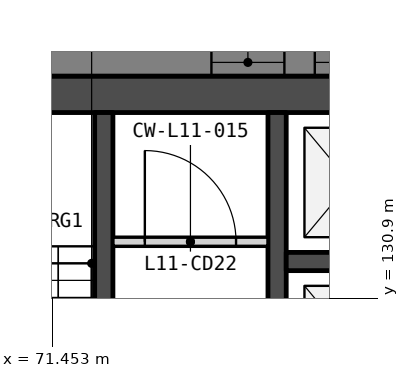
"""IFC4 building model, lengths in metres.
Left out: names, types, materials, properties, quantities, classifications, styles, units other than length and angle.
Written with IfcOpenShell. Run it as: python <this file> out.ifc"""

import sys

from ifc_helpers import new_model, si_unit, direction, frame, frame_2d, origin, place, context, subcontext, project, spatial, polyline, rectangle, outline, extrude, element, fill, save


model = new_model("IFC4")
c1 = context("Model", 3, precision=1e-05, world=origin(), true_north=direction((0.0, 1.0)))
c2 = subcontext(c1, "Body", "Model", "MODEL_VIEW")
j1 = project(units=[si_unit("LENGTHUNIT", "METRE"), si_unit("PLANEANGLEUNIT", "RADIAN")], contexts=[c1])
p1 = place(None, origin())
s1 = spatial("IfcSite", under=j1, at=p1, CompositionType="ELEMENT")
p2 = place(p1, origin())
s2 = spatial("IfcBuilding", under=s1, at=p2, CompositionType="ELEMENT")
p3 = place(p2, frame((0.0, 0.0, 52.5)))
s3 = spatial("IfcBuildingStorey", under=s2, at=p3, CompositionType="ELEMENT", Elevation=52.5)
p4 = place(p3, frame((66.0, 134.25, 0.0), z_axis=(0.0, 0.0, 1.0), x_axis=(1.0, 0.0, 0.0)))
e1 = element("IfcWall", 1, at=p4, inside=s3, PredefinedType="SOLIDWALL", context=c2, shape_type="SweptSolid", body=[
    extrude(rectangle(XDim=28.0, YDim=0.6, at=frame_2d((14.0, 0.0))), origin(), (0.0, 0.0, 1.0), 3.35),
])
p5 = place(p3, frame((72.3, 133.95, 0.0), z_axis=(0.0, 0.0, 1.0), x_axis=(0.0, -1.0, 0.0)))
e2 = element("IfcWall", 2, at=p5, inside=s3, PredefinedType="SOLIDWALL", context=c2, shape_type="SweptSolid", body=[
    extrude(rectangle(XDim=11.7, YDim=0.3, at=frame_2d((5.85, 0.0))), origin(), (0.0, 0.0, 1.0), 3.35),
])
p6 = place(p5, frame((6.95, 0.0, 0.0)))
e3 = element("IfcOpeningElement", 3, at=p6, cuts=e2, PredefinedType="OPENING", context=c2, shape_type="SweptSolid", body=[
    extrude(rectangle(XDim=1.1, YDim=2.1, at=frame_2d((0.55, 1.05))), frame((0.0, 0.16, 0.0), z_axis=(0.0, -1.0, 0.0), x_axis=(1.0, 0.0, 0.0)), (0.0, 0.0, 1.0), 0.32),
])
p7 = place(p5, frame((9.35, 0.0, 0.0)))
e4 = element("IfcOpeningElement", 4, at=p7, cuts=e2, PredefinedType="OPENING", context=c2, shape_type="SweptSolid", body=[
    extrude(rectangle(XDim=0.9, YDim=2.1, at=frame_2d((0.45, 1.05))), frame((0.0, 0.16, 0.0), z_axis=(0.0, -1.0, 0.0), x_axis=(1.0, 0.0, 0.0)), (0.0, 0.0, 1.0), 0.32),
])
p8 = place(p5, frame((5.1, 0.0, 0.0)))
e5 = element("IfcOpeningElement", 5, at=p8, cuts=e2, PredefinedType="OPENING", context=c2, shape_type="SweptSolid", body=[
    extrude(rectangle(XDim=1.0, YDim=2.1, at=frame_2d((0.5, 1.05))), frame((0.0, 0.16, 0.0), z_axis=(0.0, -1.0, 0.0), x_axis=(1.0, 0.0, 0.0)), (0.0, 0.0, 1.0), 0.32),
])
p9 = place(p3, frame((72.45, 131.825, 0.0), z_axis=(0.0, 0.0, 1.0), x_axis=(1.0, 0.0, 0.0)))
e6 = element("IfcWall", 6, at=p9, inside=s3, PredefinedType="PARTITIONING", context=c2, shape_type="SweptSolid", body=[
    extrude(rectangle(XDim=2.55, YDim=0.15, at=frame_2d((1.275, 0.0))), origin(), (0.0, 0.0, 1.0), 3.35),
])
p10 = place(p9, frame((0.525, 0.0, 0.0)))
e7 = element("IfcOpeningElement", 7, at=p10, cuts=e6, PredefinedType="OPENING", context=c2, shape_type="SweptSolid", body=[
    extrude(rectangle(XDim=1.5, YDim=2.1, at=frame_2d((0.75, 1.05))), frame((0.0, 0.085, 0.0), z_axis=(0.0, -1.0, 0.0), x_axis=(1.0, 0.0, 0.0)), (0.0, 0.0, 1.0), 0.17),
])
p11 = place(p3, frame((75.15, 133.95, 0.0), z_axis=(0.0, 0.0, 1.0), x_axis=(0.0, -1.0, 0.0)))
e8 = element("IfcWall", 8, at=p11, inside=s3, PredefinedType="SOLIDWALL", context=c2, shape_type="SweptSolid", body=[
    extrude(rectangle(XDim=11.7, YDim=0.3, at=frame_2d((5.85, 0.0))), origin(), (0.0, 0.0, 1.0), 3.35),
])
p12 = place(p3, frame((75.3, 131.5, 0.0), z_axis=(0.0, 0.0, 1.0), x_axis=(1.0, 0.0, 0.0)))
e9 = element("IfcWall", 9, at=p12, inside=s3, PredefinedType="SOLIDWALL", context=c2, shape_type="SweptSolid", body=[
    extrude(rectangle(XDim=2.1, YDim=0.3, at=frame_2d((1.05, 0.0))), origin(), (0.0, 0.0, 1.0), 3.35),
])
p13 = place(p3, frame((102.4, 134.775, -0.15), z_axis=(0.0, 0.0, 1.0), x_axis=(-1.0, 0.0, 0.0)))
e10 = element("IfcWall", 10, at=p13, inside=s3, PredefinedType="SOLIDWALL", context=c2, shape_type="SweptSolid", body=[
    extrude(outline(polyline([(44.8, 0.0), (44.8, 3.5), (0.0, 3.5), (0.0, 0.0), (44.8, 0.0)])), frame((0.0, 0.225, 0.0), z_axis=(0.0, -1.0, 0.0), x_axis=(1.0, 0.0, 0.0)), (0.0, 0.0, 1.0), 0.45),
])
p14 = place(p13, frame((0.722, 0.0, 1.05)))
e11 = element("IfcOpeningElement", 11, at=p14, cuts=e10, PredefinedType="OPENING", context=c2, shape_type="SweptSolid", body=[
    extrude(rectangle(XDim=1.2, YDim=1.5, at=frame_2d((0.6, 0.75))), frame((0.0, 0.235, 0.0), z_axis=(0.0, -1.0, 0.0), x_axis=(1.0, 0.0, 0.0)), (0.0, 0.0, 1.0), 0.47),
])
p15 = place(p13, frame((7.51, 0.0, 1.05)))
e12 = element("IfcOpeningElement", 12, at=p15, cuts=e10, PredefinedType="OPENING", context=c2, shape_type="SweptSolid", body=[
    extrude(rectangle(XDim=1.2, YDim=1.5, at=frame_2d((0.6, 0.75))), frame((0.0, 0.235, 0.0), z_axis=(0.0, -1.0, 0.0), x_axis=(1.0, 0.0, 0.0)), (0.0, 0.0, 1.0), 0.47),
])
p16 = place(p13, frame((9.21, 0.0, 1.05)))
e13 = element("IfcOpeningElement", 13, at=p16, cuts=e10, PredefinedType="OPENING", context=c2, shape_type="SweptSolid", body=[
    extrude(rectangle(XDim=1.2, YDim=1.5, at=frame_2d((0.6, 0.75))), frame((0.0, 0.235, 0.0), z_axis=(0.0, -1.0, 0.0), x_axis=(1.0, 0.0, 0.0)), (0.0, 0.0, 1.0), 0.47),
])
p17 = place(p13, frame((16.47, 0.0, 1.05)))
e14 = element("IfcOpeningElement", 14, at=p17, cuts=e10, PredefinedType="OPENING", context=c2, shape_type="SweptSolid", body=[
    extrude(rectangle(XDim=1.2, YDim=1.5, at=frame_2d((0.6, 0.75))), frame((0.0, 0.235, 0.0), z_axis=(0.0, -1.0, 0.0), x_axis=(1.0, 0.0, 0.0)), (0.0, 0.0, 1.0), 0.47),
])
p18 = place(p13, frame((18.17, 0.0, 1.05)))
e15 = element("IfcOpeningElement", 15, at=p18, cuts=e10, PredefinedType="OPENING", context=c2, shape_type="SweptSolid", body=[
    extrude(rectangle(XDim=1.2, YDim=1.5, at=frame_2d((0.6, 0.75))), frame((0.0, 0.235, 0.0), z_axis=(0.0, -1.0, 0.0), x_axis=(1.0, 0.0, 0.0)), (0.0, 0.0, 1.0), 0.47),
])
p19 = place(p13, frame((25.43, 0.0, 1.05)))
e16 = element("IfcOpeningElement", 16, at=p19, cuts=e10, PredefinedType="OPENING", context=c2, shape_type="SweptSolid", body=[
    extrude(rectangle(XDim=1.2, YDim=1.5, at=frame_2d((0.6, 0.75))), frame((0.0, 0.235, 0.0), z_axis=(0.0, -1.0, 0.0), x_axis=(1.0, 0.0, 0.0)), (0.0, 0.0, 1.0), 0.47),
])
p20 = place(p13, frame((27.13, 0.0, 1.05)))
e17 = element("IfcOpeningElement", 17, at=p20, cuts=e10, PredefinedType="OPENING", context=c2, shape_type="SweptSolid", body=[
    extrude(rectangle(XDim=1.2, YDim=1.5, at=frame_2d((0.6, 0.75))), frame((0.0, 0.235, 0.0), z_axis=(0.0, -1.0, 0.0), x_axis=(1.0, 0.0, 0.0)), (0.0, 0.0, 1.0), 0.47),
])
p21 = place(p13, frame((34.39, 0.0, 1.05)))
e18 = element("IfcOpeningElement", 18, at=p21, cuts=e10, PredefinedType="OPENING", context=c2, shape_type="SweptSolid", body=[
    extrude(rectangle(XDim=1.2, YDim=1.5, at=frame_2d((0.6, 0.75))), frame((0.0, 0.235, 0.0), z_axis=(0.0, -1.0, 0.0), x_axis=(1.0, 0.0, 0.0)), (0.0, 0.0, 1.0), 0.47),
])
p22 = place(p13, frame((36.09, 0.0, 1.05)))
e19 = element("IfcOpeningElement", 19, at=p22, cuts=e10, PredefinedType="OPENING", context=c2, shape_type="SweptSolid", body=[
    extrude(rectangle(XDim=1.2, YDim=1.5, at=frame_2d((0.6, 0.75))), frame((0.0, 0.235, 0.0), z_axis=(0.0, -1.0, 0.0), x_axis=(1.0, 0.0, 0.0)), (0.0, 0.0, 1.0), 0.47),
])
p23 = place(p13, frame((42.878, 0.0, 1.05)))
e20 = element("IfcOpeningElement", 20, at=p23, cuts=e10, PredefinedType="OPENING", context=c2, shape_type="SweptSolid", body=[
    extrude(rectangle(XDim=1.2, YDim=1.5, at=frame_2d((0.6, 0.75))), frame((0.0, 0.235, 0.0), z_axis=(0.0, -1.0, 0.0), x_axis=(1.0, 0.0, 0.0)), (0.0, 0.0, 1.0), 0.47),
])
p24 = place(p10, origin())
e21 = element("IfcDoor", 21, at=p24, inside=s3, OperationType="DOUBLE_DOOR_DOUBLE_SWING", PredefinedType="DOOR", context=c2, shape_type="SweptSolid", body=[
    extrude(rectangle(XDim=1.5, YDim=2.1, at=frame_2d((0.75, 1.05))), frame((0.0, 0.025, 0.0), z_axis=(0.0, -1.0, 0.0), x_axis=(1.0, 0.0, 0.0)), (0.0, 0.0, 1.0), 0.05),
])
fill(e7, e21)
p25 = place(p19, origin())
e22 = element("IfcWindow", 22, at=p25, inside=s3, PartitioningType="SINGLE_PANEL", PredefinedType="WINDOW", context=c2, shape_type="SweptSolid", body=[
    extrude(rectangle(XDim=1.2, YDim=1.5, at=frame_2d((0.6, 0.75))), frame((0.0, 0.03, 0.0), z_axis=(0.0, -1.0, 0.0), x_axis=(1.0, 0.0, 0.0)), (0.0, 0.0, 1.0), 0.06),
])
fill(e16, e22)
p26 = place(p20, origin())
e23 = element("IfcWindow", 23, at=p26, inside=s3, PartitioningType="SINGLE_PANEL", PredefinedType="WINDOW", context=c2, shape_type="SweptSolid", body=[
    extrude(rectangle(XDim=1.2, YDim=1.5, at=frame_2d((0.6, 0.75))), frame((0.0, 0.03, 0.0), z_axis=(0.0, -1.0, 0.0), x_axis=(1.0, 0.0, 0.0)), (0.0, 0.0, 1.0), 0.06),
])
fill(e17, e23)
save(model, sys.argv[1])
